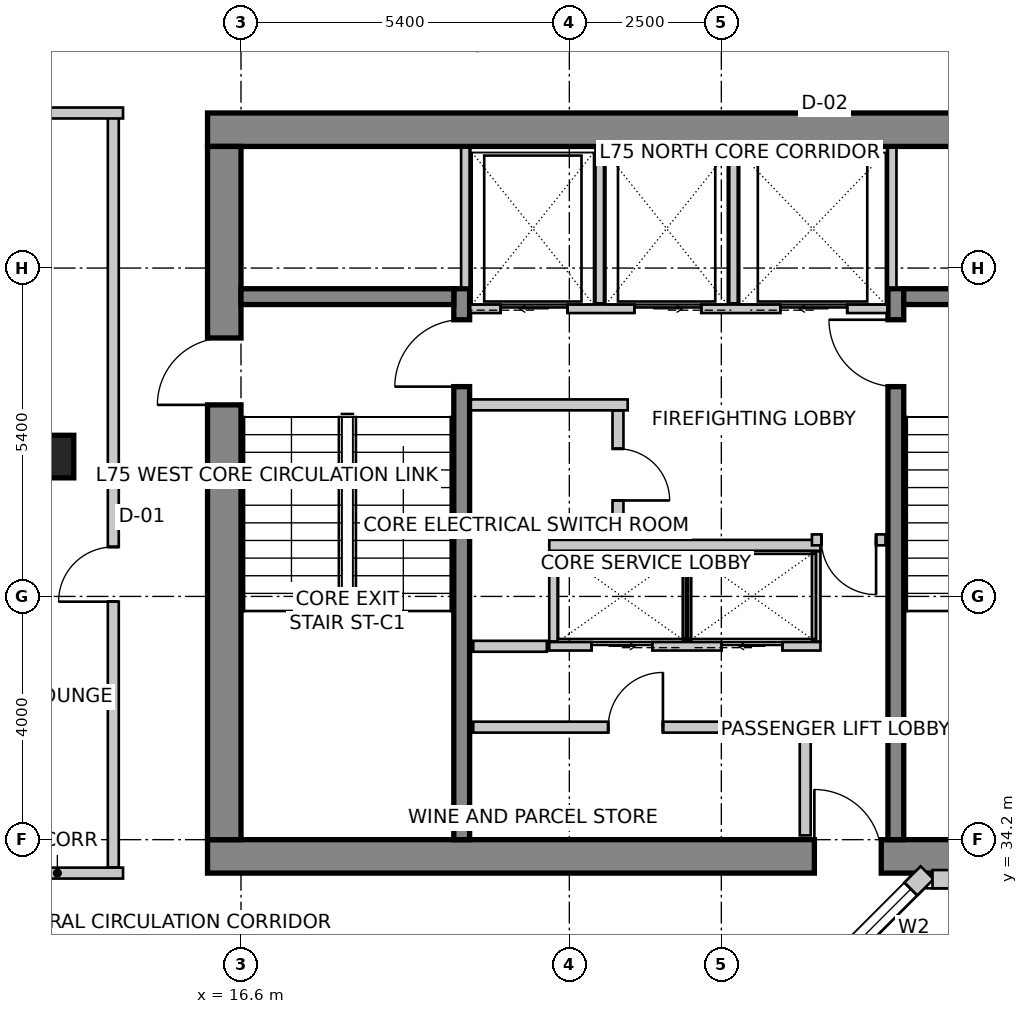
"""IFC4 building model, lengths in metres.
Left out: names, types, materials, properties, quantities, classifications, styles, units other than length and angle.
Written with IfcOpenShell. Run it as: python <this file> out.ifc"""

import sys

from ifc_helpers import new_model, si_unit, direction, frame, frame_2d, origin, origin_2d, place, context, subcontext, project, spatial, rectangle, extrude, source, transform, mapped, element, fill, save


model = new_model("IFC4")
c1 = context("Model", 3, precision=1e-05, world=origin(), true_north=direction((0.0, 1.0)))
c2 = subcontext(c1, "Body", "Model", "MODEL_VIEW")
j1 = project(units=[si_unit("LENGTHUNIT", "METRE"), si_unit("PLANEANGLEUNIT", "RADIAN")], contexts=[c1])
p1 = place(None, origin())
s1 = spatial("IfcSite", under=j1, at=p1, CompositionType="ELEMENT")
p2 = place(p1, origin())
s2 = spatial("IfcBuilding", under=s1, at=p2, CompositionType="ELEMENT")
p3 = place(p2, frame((0.0, 0.0, 292.5)))
s3 = spatial("IfcBuildingStorey", under=s2, at=p3, CompositionType="ELEMENT", Elevation=292.5)
p4 = place(p3, frame((16.05, 45.875, 0.0), z_axis=(0.0, 0.0, 1.0), x_axis=(1.0, 0.0, 0.0)))
e1 = element("IfcWall", 1, at=p4, inside=s3, PredefinedType="SHEAR", context=c2, shape_type="SweptSolid", body=[
    extrude(rectangle(XDim=15.5, YDim=0.55, at=frame_2d((7.75, 0.0))), origin(), (0.0, 0.0, 1.0), 4.0),
])
p5 = place(p3, frame((16.05, 33.925, 0.0), z_axis=(0.0, 0.0, 1.0), x_axis=(1.0, 0.0, 0.0)))
e2 = element("IfcWall", 2, at=p5, inside=s3, PredefinedType="SHEAR", context=c2, shape_type="SweptSolid", body=[
    extrude(rectangle(XDim=15.5, YDim=0.55, at=frame_2d((7.75, 0.0))), origin(), (0.0, 0.0, 1.0), 4.0),
])
m1 = source(origin(), c2, "Body", "SweptSolid", [
    extrude(rectangle(XDim=1.1, YDim=2.15, at=frame_2d((0.55, 1.075))), frame((0.0, 0.285, 0.0), z_axis=(0.0, -1.0, 0.0), x_axis=(1.0, 0.0, 0.0)), (0.0, 0.0, 1.0), 0.57),
])
p6 = place(p5, frame((9.98, 0.0, 0.0)))
e3 = element("IfcOpeningElement", 3, at=p6, cuts=e2, PredefinedType="OPENING", context=c2, shape_type="MappedRepresentation", body=[
    mapped(m1, transform((0.0, 0.0, 0.0), scale=1.0)),
])
p7 = place(p3, frame((16.325, 34.2, 0.0), z_axis=(0.0, 0.0, 1.0), x_axis=(0.0, 1.0, 0.0)))
e4 = element("IfcWall", 4, at=p7, inside=s3, PredefinedType="SHEAR", context=c2, shape_type="SweptSolid", body=[
    extrude(rectangle(XDim=11.4, YDim=0.55, at=frame_2d((5.7, 0.0))), origin(), (0.0, 0.0, 1.0), 4.0),
])
p8 = place(p7, frame((7.15, 0.0, 0.0)))
e5 = element("IfcOpeningElement", 5, at=p8, cuts=e4, PredefinedType="OPENING", context=c2, shape_type="MappedRepresentation", body=[
    mapped(m1, transform((0.0, 0.0, 0.0), scale=1.0)),
])
p9 = place(p3, frame((20.23, 34.2, 0.0), z_axis=(0.0, 0.0, 1.0), x_axis=(0.0, 1.0, 0.0)))
e6 = element("IfcWall", 6, at=p9, inside=s3, PredefinedType="SHEAR", context=c2, shape_type="SweptSolid", body=[
    extrude(rectangle(XDim=9.06, YDim=0.26, at=frame_2d((4.53, 0.0))), origin(), (0.0, 0.0, 1.0), 4.0),
])
m2 = source(origin(), c2, "Body", "SweptSolid", [
    extrude(rectangle(XDim=1.1, YDim=2.15, at=frame_2d((0.55, 1.075))), frame((0.0, 0.14, 0.0), z_axis=(0.0, -1.0, 0.0), x_axis=(1.0, 0.0, 0.0)), (0.0, 0.0, 1.0), 0.28),
])
p10 = place(p9, frame((7.45, 0.0, 0.0)))
e7 = element("IfcOpeningElement", 7, at=p10, cuts=e6, PredefinedType="OPENING", context=c2, shape_type="MappedRepresentation", body=[
    mapped(m2, transform((0.0, 0.0, 0.0), scale=1.0)),
])
p11 = place(p3, frame((27.37, 34.2, 0.0), z_axis=(0.0, 0.0, 1.0), x_axis=(0.0, 1.0, 0.0)))
e8 = element("IfcWall", 8, at=p11, inside=s3, PredefinedType="SHEAR", context=c2, shape_type="SweptSolid", body=[
    extrude(rectangle(XDim=9.06, YDim=0.26, at=frame_2d((4.53, 0.0))), origin(), (0.0, 0.0, 1.0), 4.0),
])
p12 = place(p11, frame((7.45, 0.0, 0.0)))
e9 = element("IfcOpeningElement", 9, at=p12, cuts=e8, PredefinedType="OPENING", context=c2, shape_type="MappedRepresentation", body=[
    mapped(m2, transform((0.0, 0.0, 0.0), scale=1.0)),
])
for number, where, z_axis, x_axis in (
    (10, (16.6, 43.13, 0.0), (0.0, 0.0, 1.0), (1.0, 0.0, 0.0)),
    (11, (27.5, 43.13, 0.0), (0.0, 0.0, 1.0), (1.0, 0.0, 0.0)),
):
    element("IfcWall", number, at=place(p3, frame(where, z_axis=z_axis, x_axis=x_axis)), inside=s3, PredefinedType="SHEAR", context=c2, shape_type="SweptSolid", body=[
        extrude(rectangle(XDim=3.5, YDim=0.26, at=frame_2d((1.75, 0.0))), origin(), (0.0, 0.0, 1.0), 4.0),
    ])
m3 = source(origin(), c2, "Body", "SweptSolid", [
    extrude(rectangle(XDim=0.7, YDim=0.7, at=origin_2d()), origin(), (0.0, 0.0, 1.0), 4.0),
])
p13 = place(p3, frame((13.5, 40.5, 0.0), z_axis=(0.0, 0.0, 1.0), x_axis=(1.0, 0.0, 0.0)))
e12 = element("IfcColumn", 12, at=p13, inside=s3, PredefinedType="COLUMN", context=c2, shape_type="MappedRepresentation", body=[
    mapped(m3, transform((0.0, 0.0, 0.0), scale=1.0)),
])
p14 = place(p3, frame((25.828, 31.6, 0.0), z_axis=(0.0, 0.0, 1.0), x_axis=(0.707106781187, 0.707106781187, 0.0)))
e13 = element("IfcWall", 13, at=p14, inside=s3, PredefinedType="SOLIDWALL", context=c2, shape_type="SweptSolid", body=[
    extrude(rectangle(XDim=2.907, YDim=0.3, at=frame_2d((1.454, 0.0))), origin(), (0.0, 0.0, 1.0), 3.75),
])
m4 = source(origin(), c2, "Body", "SweptSolid", [
    extrude(rectangle(XDim=1.8, YDim=2.1, at=frame_2d((0.9, 1.05))), frame((0.0, 0.16, 0.0), z_axis=(0.0, -1.0, 0.0), x_axis=(1.0, 0.0, 0.0)), (0.0, 0.0, 1.0), 0.32),
])
p15 = place(p14, frame((0.729, 0.0, 0.85)))
e14 = element("IfcOpeningElement", 14, at=p15, cuts=e13, PredefinedType="OPENING", context=c2, shape_type="MappedRepresentation", body=[
    mapped(m4, transform((0.0, 0.0, 0.0), scale=1.0)),
])
p16 = place(p3, frame((27.973, 33.55, 0.0), z_axis=(0.0, 0.0, 1.0), x_axis=(1.0, 0.0, 0.0)))
e15 = element("IfcWall", 15, at=p16, inside=s3, PredefinedType="SOLIDWALL", context=c2, shape_type="SweptSolid", body=[
    extrude(rectangle(XDim=9.115, YDim=0.3, at=frame_2d((4.558, 0.0))), origin(), (0.0, 0.0, 1.0), 3.75),
])
m5 = source(origin(), c2, "Body", "SweptSolid", [
    extrude(rectangle(XDim=2.4, YDim=2.2, at=frame_2d((1.2, 1.1))), frame((0.0, 0.16, 0.0), z_axis=(0.0, -1.0, 0.0), x_axis=(1.0, 0.0, 0.0)), (0.0, 0.0, 1.0), 0.32),
])
p17 = place(p16, frame((1.239, 0.0, 0.85)))
e16 = element("IfcOpeningElement", 16, at=p17, cuts=e15, PredefinedType="OPENING", context=c2, shape_type="MappedRepresentation", body=[
    mapped(m5, transform((0.0, 0.0, 0.0), scale=1.0)),
])
m6 = source(origin(), c2, "Body", "SweptSolid", [
    extrude(rectangle(XDim=2.8, YDim=2.4, at=frame_2d((1.4, 1.2))), frame((0.0, 0.16, 0.0), z_axis=(0.0, -1.0, 0.0), x_axis=(1.0, 0.0, 0.0)), (0.0, 0.0, 1.0), 0.32),
])
p18 = place(p16, frame((5.276, 0.0, 0.85)))
e17 = element("IfcOpeningElement", 17, at=p18, cuts=e15, PredefinedType="OPENING", context=c2, shape_type="MappedRepresentation", body=[
    mapped(m6, transform((0.0, 0.0, 0.0), scale=1.0)),
])
p19 = place(p3, frame((21.873, 52.741, 0.0), z_axis=(0.0, 0.0, 1.0), x_axis=(-0.843661487732, -0.536875492193, 0.0)))
e18 = element("IfcWall", 18, at=p19, inside=s3, PredefinedType="SOLIDWALL", context=c2, shape_type="SweptSolid", body=[
    extrude(rectangle(XDim=10.282, YDim=0.3, at=frame_2d((5.141, 0.0))), origin(), (0.0, 0.0, 1.0), 3.75),
])
p20 = place(p19, frame((1.06, 0.0, 0.85)))
e19 = element("IfcOpeningElement", 19, at=p20, cuts=e18, PredefinedType="OPENING", context=c2, shape_type="MappedRepresentation", body=[
    mapped(m6, transform((0.0, 0.0, 0.0), scale=1.0)),
])
p21 = place(p19, frame((5.539, 0.0, 0.85)))
e20 = element("IfcOpeningElement", 20, at=p21, cuts=e18, PredefinedType="OPENING", context=c2, shape_type="MappedRepresentation", body=[
    mapped(m5, transform((0.0, 0.0, 0.0), scale=1.0)),
])
p22 = place(p3, frame((20.37, 42.93, 0.0), z_axis=(0.0, 0.0, 1.0), x_axis=(1.0, 0.0, 0.0)))
e21 = element("IfcWall", 21, at=p22, inside=s3, PredefinedType="SOLIDWALL", context=c2, shape_type="SweptSolid", body=[
    extrude(rectangle(XDim=6.86, YDim=0.14, at=frame_2d((3.43, 0.0))), origin(), (0.0, 0.0, 1.0), 3.75),
])
m7 = source(origin(), c2, "Body", "SweptSolid", [
    extrude(rectangle(XDim=1.1, YDim=2.15, at=frame_2d((0.55, 1.075))), frame((0.0, 0.08, 0.0), z_axis=(0.0, -1.0, 0.0), x_axis=(1.0, 0.0, 0.0)), (0.0, 0.0, 1.0), 0.16),
])
p23 = place(p22, frame((0.5, 0.0, 0.0)))
e22 = element("IfcOpeningElement", 22, at=p23, cuts=e21, PredefinedType="OPENING", context=c2, shape_type="MappedRepresentation", body=[
    mapped(m7, transform((0.0, 0.0, 0.0), scale=1.0)),
])
p24 = place(p22, frame((2.7, 0.0, 0.0)))
e23 = element("IfcOpeningElement", 23, at=p24, cuts=e21, PredefinedType="OPENING", context=c2, shape_type="MappedRepresentation", body=[
    mapped(m7, transform((0.0, 0.0, 0.0), scale=1.0)),
])
p25 = place(p22, frame((5.1, 0.0, 0.0)))
e24 = element("IfcOpeningElement", 24, at=p25, cuts=e21, PredefinedType="OPENING", context=c2, shape_type="MappedRepresentation", body=[
    mapped(m7, transform((0.0, 0.0, 0.0), scale=1.0)),
])
for number, where, z_axis, x_axis in (
    (25, (20.29, 43.28, 0.0), (0.0, 0.0, 1.0), (0.0, 1.0, 0.0)),
    (26, (27.31, 43.28, 0.0), (0.0, 0.0, 1.0), (0.0, 1.0, 0.0)),
):
    element("IfcWall", number, at=place(p3, frame(where, z_axis=z_axis, x_axis=x_axis)), inside=s3, PredefinedType="SOLIDWALL", context=c2, shape_type="SweptSolid", body=[
        extrude(rectangle(XDim=2.3, YDim=0.14, at=frame_2d((1.15, 0.0))), origin(), (0.0, 0.0, 1.0), 3.75),
    ])
for number, where, z_axis, x_axis in (
    (27, (22.5, 43.02, 0.0), (0.0, 0.0, 1.0), (0.0, 1.0, 0.0)),
    (28, (24.7, 43.02, 0.0), (0.0, 0.0, 1.0), (0.0, 1.0, 0.0)),
):
    element("IfcWall", number, at=place(p3, frame(where, z_axis=z_axis, x_axis=x_axis)), inside=s3, PredefinedType="SOLIDWALL", context=c2, shape_type="SweptSolid", body=[
        extrude(rectangle(XDim=2.56, YDim=0.14, at=frame_2d((1.28, 0.0))), origin(), (0.0, 0.0, 1.0), 3.75),
    ])
p26 = place(p3, frame((21.67, 37.38, 0.0), z_axis=(0.0, 0.0, 1.0), x_axis=(1.0, 0.0, 0.0)))
e29 = element("IfcWall", 29, at=p26, inside=s3, PredefinedType="SOLIDWALL", context=c2, shape_type="SweptSolid", body=[
    extrude(rectangle(XDim=4.46, YDim=0.14, at=frame_2d((2.23, 0.0))), origin(), (0.0, 0.0, 1.0), 3.75),
])
m8 = source(origin(), c2, "Body", "SweptSolid", [
    extrude(rectangle(XDim=1.0, YDim=2.15, at=frame_2d((0.5, 1.075))), frame((0.0, 0.08, 0.0), z_axis=(0.0, -1.0, 0.0), x_axis=(1.0, 0.0, 0.0)), (0.0, 0.0, 1.0), 0.16),
])
p27 = place(p26, frame((0.695, 0.0, 0.0)))
e30 = element("IfcOpeningElement", 30, at=p27, cuts=e29, PredefinedType="OPENING", context=c2, shape_type="MappedRepresentation", body=[
    mapped(m8, transform((0.0, 0.0, 0.0), scale=1.0)),
])
p28 = place(p26, frame((2.835, 0.0, 0.0)))
e31 = element("IfcOpeningElement", 31, at=p28, cuts=e29, PredefinedType="OPENING", context=c2, shape_type="MappedRepresentation", body=[
    mapped(m8, transform((0.0, 0.0, 0.0), scale=1.0)),
])
p29 = place(p3, frame((21.67, 39.04, 0.0), z_axis=(0.0, 0.0, 1.0), x_axis=(1.0, 0.0, 0.0)))
e32 = element("IfcWall", 32, at=p29, inside=s3, PredefinedType="SOLIDWALL", context=c2, shape_type="SweptSolid", body=[
    extrude(rectangle(XDim=4.46, YDim=0.18, at=frame_2d((2.23, 0.0))), origin(), (0.0, 0.0, 1.0), 3.75),
])
for number, where, z_axis, x_axis in (
    (33, (26.06, 37.46, 0.0), (0.0, 0.0, 1.0), (0.0, 1.0, 0.0)),
    (34, (21.74, 37.46, 0.0), (0.0, 0.0, 1.0), (0.0, 1.0, 0.0)),
    (35, (23.935, 37.46, 0.0), (0.0, 0.0, 1.0), (0.0, 1.0, 0.0)),
):
    element("IfcWall", number, at=place(p3, frame(where, z_axis=z_axis, x_axis=x_axis)), inside=s3, PredefinedType="SOLIDWALL", context=c2, shape_type="SweptSolid", body=[
        extrude(rectangle(XDim=1.48, YDim=0.14, at=frame_2d((0.74, 0.0))), origin(), (0.0, 0.0, 1.0), 3.75),
    ])
p30 = place(p3, frame((22.96, 41.35, 0.0), z_axis=(0.0, 0.0, 1.0), x_axis=(-1.0, 0.0, 0.0)))
e36 = element("IfcWall", 36, at=p30, inside=s3, PredefinedType="PARTITIONING", context=c2, shape_type="SweptSolid", body=[
    extrude(rectangle(XDim=2.58, YDim=0.18, at=frame_2d((1.29, 0.0))), origin(), (0.0, 0.0, 1.0), 3.75),
])
p31 = place(p3, frame((22.8, 41.256, 0.0), z_axis=(0.0, 0.0, 1.0), x_axis=(0.0, -1.0, 0.0)))
e37 = element("IfcWall", 37, at=p31, inside=s3, PredefinedType="PARTITIONING", context=c2, shape_type="SweptSolid", body=[
    extrude(rectangle(XDim=2.106, YDim=0.18, at=frame_2d((1.053, 0.0))), origin(), (0.0, 0.0, 1.0), 3.75),
])
m9 = source(origin(), c2, "Body", "SweptSolid", [
    extrude(rectangle(XDim=0.85, YDim=2.15, at=frame_2d((0.425, 1.075))), frame((0.0, 0.1, 0.0), z_axis=(0.0, -1.0, 0.0), x_axis=(1.0, 0.0, 0.0)), (0.0, 0.0, 1.0), 0.2),
])
p32 = place(p31, frame((0.628, 0.0, 0.0)))
e38 = element("IfcOpeningElement", 38, at=p32, cuts=e37, PredefinedType="OPENING", context=c2, shape_type="MappedRepresentation", body=[
    mapped(m9, transform((0.0, 0.0, 0.0), scale=1.0)),
])
p33 = place(p3, frame((21.63, 37.38, 0.0), z_axis=(0.0, 0.0, 1.0), x_axis=(-1.0, 0.0, 0.0)))
e39 = element("IfcWall", 39, at=p33, inside=s3, PredefinedType="PARTITIONING", context=c2, shape_type="SweptSolid", body=[
    extrude(rectangle(XDim=1.21, YDim=0.18, at=frame_2d((0.605, 0.0))), origin(), (0.0, 0.0, 1.0), 3.75),
])
p34 = place(p3, frame((27.2, 39.13, 0.0), z_axis=(0.0, 0.0, 1.0), x_axis=(-1.0, 0.0, 0.0)))
e40 = element("IfcWall", 40, at=p34, inside=s3, PredefinedType="PARTITIONING", context=c2, shape_type="SweptSolid", body=[
    extrude(rectangle(XDim=1.21, YDim=0.18, at=frame_2d((0.605, 0.0))), origin(), (0.0, 0.0, 1.0), 3.75),
])
m10 = source(origin(), c2, "Body", "SweptSolid", [
    extrude(rectangle(XDim=0.9, YDim=2.15, at=frame_2d((0.45, 1.075))), frame((0.0, 0.1, 0.0), z_axis=(0.0, -1.0, 0.0), x_axis=(1.0, 0.0, 0.0)), (0.0, 0.0, 1.0), 0.2),
])
p35 = place(p34, frame((0.155, 0.0, 0.0)))
e41 = element("IfcOpeningElement", 41, at=p35, cuts=e40, PredefinedType="OPENING", context=c2, shape_type="MappedRepresentation", body=[
    mapped(m10, transform((0.0, 0.0, 0.0), scale=1.0)),
])
p36 = place(p3, frame((20.42, 36.05, 0.0), z_axis=(0.0, 0.0, 1.0), x_axis=(1.0, 0.0, 0.0)))
e42 = element("IfcWall", 42, at=p36, inside=s3, PredefinedType="PARTITIONING", context=c2, shape_type="SweptSolid", body=[
    extrude(rectangle(XDim=5.46, YDim=0.18, at=frame_2d((2.73, 0.0))), origin(), (0.0, 0.0, 1.0), 3.75),
])
p37 = place(p36, frame((2.219, 0.0, 0.0)))
e43 = element("IfcOpeningElement", 43, at=p37, cuts=e42, PredefinedType="OPENING", context=c2, shape_type="MappedRepresentation", body=[
    mapped(m10, transform((0.0, 0.0, 0.0), scale=1.0)),
])
p38 = place(p3, frame((25.88, 35.956, 0.0), z_axis=(0.0, 0.0, 1.0), x_axis=(0.0, -1.0, 0.0)))
e44 = element("IfcWall", 44, at=p38, inside=s3, PredefinedType="PARTITIONING", context=c2, shape_type="SweptSolid", body=[
    extrude(rectangle(XDim=1.686, YDim=0.18, at=frame_2d((0.843, 0.0))), origin(), (0.0, 0.0, 1.0), 3.042),
])
p39 = place(p3, frame((12.5, 33.65, 0.0), z_axis=(0.0, 0.0, 1.0), x_axis=(1.0, 0.0, 0.0)))
e45 = element("IfcWall", 45, at=p39, inside=s3, PredefinedType="PARTITIONING", context=c2, shape_type="SweptSolid", body=[
    extrude(rectangle(XDim=2.16, YDim=0.18, at=frame_2d((1.08, 0.0))), origin(), (0.0, 0.0, 1.0), 3.75),
])
p40 = place(p3, frame((14.5, 33.744, 0.0), z_axis=(0.0, 0.0, 1.0), x_axis=(0.0, 1.0, 0.0)))
e46 = element("IfcWall", 46, at=p40, inside=s3, PredefinedType="PARTITIONING", context=c2, shape_type="SweptSolid", body=[
    extrude(rectangle(XDim=12.406, YDim=0.18, at=frame_2d((6.203, 0.0))), origin(), (0.0, 0.0, 1.0), 3.75),
])
p41 = place(p40, frame((4.37, 0.0, 0.0)))
e47 = element("IfcOpeningElement", 47, at=p41, cuts=e46, PredefinedType="OPENING", context=c2, shape_type="MappedRepresentation", body=[
    mapped(m10, transform((0.0, 0.0, 0.0), scale=1.0)),
])
p42 = place(p3, frame((14.66, 46.15, 0.0), z_axis=(0.0, 0.0, 1.0), x_axis=(-1.0, 0.0, 0.0)))
e48 = element("IfcWall", 48, at=p42, inside=s3, PredefinedType="PARTITIONING", context=c2, shape_type="SweptSolid", body=[
    extrude(rectangle(XDim=1.602, YDim=0.18, at=frame_2d((0.801, 0.0))), origin(), (0.0, 0.0, 1.0), 3.75),
])
m11 = source(origin(), c2, "Body", "SweptSolid", [
    extrude(rectangle(XDim=1.8, YDim=2.1, at=frame_2d((0.9, 1.05))), frame((0.0, -0.015, 0.0), z_axis=(0.0, -1.0, 0.0), x_axis=(1.0, 0.0, 0.0)), (0.0, 0.0, 1.0), 0.06),
])
p43 = place(p15, origin())
e49 = element("IfcWindow", 49, at=p43, inside=s3, PartitioningType="SINGLE_PANEL", PredefinedType="WINDOW", context=c2, shape_type="MappedRepresentation", body=[
    mapped(m11, transform((0.0, 0.0, 0.0), scale=1.0)),
])
fill(e14, e49)
m12 = source(origin(), c2, "Body", "SweptSolid", [
    extrude(rectangle(XDim=1.1, YDim=2.15, at=frame_2d((0.55, 1.075))), frame((0.0, 0.025, 0.0), z_axis=(0.0, -1.0, 0.0), x_axis=(1.0, 0.0, 0.0)), (0.0, 0.0, 1.0), 0.05),
])
p44 = place(p23, origin())
e50 = element("IfcDoor", 50, at=p44, inside=s3, OperationType="SLIDING_TO_LEFT", PredefinedType="DOOR", context=c2, shape_type="MappedRepresentation", body=[
    mapped(m12, transform((0.0, 0.0, 0.0), scale=1.0)),
])
fill(e22, e50)
p45 = place(p24, origin())
e51 = element("IfcDoor", 51, at=p45, inside=s3, OperationType="SLIDING_TO_RIGHT", PredefinedType="DOOR", context=c2, shape_type="MappedRepresentation", body=[
    mapped(m12, transform((0.0, 0.0, 0.0), scale=1.0)),
])
fill(e23, e51)
m13 = source(origin(), c2, "Body", "SweptSolid", [
    extrude(rectangle(XDim=1.1, YDim=2.15, at=frame_2d((0.55, 1.075))), frame((0.0, 0.025, 0.0), z_axis=(0.0, -1.0, 0.0), x_axis=(1.0, 0.0, 0.0)), (0.0, 0.0, 1.0), 0.05),
])
p46 = place(p25, origin())
e52 = element("IfcDoor", 52, at=p46, inside=s3, OperationType="SLIDING_TO_LEFT", PredefinedType="DOOR", context=c2, shape_type="MappedRepresentation", body=[
    mapped(m13, transform((0.0, 0.0, 0.0), scale=1.0)),
])
fill(e24, e52)
m14 = source(origin(), c2, "Body", "SweptSolid", [
    extrude(rectangle(XDim=1.0, YDim=2.15, at=frame_2d((0.5, 1.075))), frame((0.0, 0.025, 0.0), z_axis=(0.0, -1.0, 0.0), x_axis=(1.0, 0.0, 0.0)), (0.0, 0.0, 1.0), 0.05),
])
p47 = place(p27, origin())
e53 = element("IfcDoor", 53, at=p47, inside=s3, OperationType="SLIDING_TO_RIGHT", PredefinedType="DOOR", context=c2, shape_type="MappedRepresentation", body=[
    mapped(m14, transform((0.0, 0.0, 0.0), scale=1.0)),
])
fill(e30, e53)
p48 = place(p28, origin())
e54 = element("IfcDoor", 54, at=p48, inside=s3, OperationType="SLIDING_TO_LEFT", PredefinedType="DOOR", context=c2, shape_type="MappedRepresentation", body=[
    mapped(m14, transform((0.0, 0.0, 0.0), scale=1.0)),
])
fill(e31, e54)
m15 = source(origin(), c2, "Body", "SweptSolid", [
    extrude(rectangle(XDim=1.1, YDim=2.15, at=frame_2d((0.55, 1.075))), frame((0.0, 0.025, 0.0), z_axis=(0.0, -1.0, 0.0), x_axis=(1.0, 0.0, 0.0)), (0.0, 0.0, 1.0), 0.05),
])
p49 = place(p10, origin())
e55 = element("IfcDoor", 55, at=p49, inside=s3, OperationType="SINGLE_SWING_LEFT", PredefinedType="DOOR", context=c2, shape_type="MappedRepresentation", body=[
    mapped(m15, transform((0.0, 0.0, 0.0), scale=1.0)),
])
fill(e7, e55)
p50 = place(p12, origin())
e56 = element("IfcDoor", 56, at=p50, inside=s3, OperationType="SINGLE_SWING_RIGHT", PredefinedType="DOOR", context=c2, shape_type="MappedRepresentation", body=[
    mapped(m15, transform((0.0, 0.0, 0.0), scale=1.0)),
])
fill(e9, e56)
p51 = place(p8, origin())
e57 = element("IfcDoor", 57, at=p51, inside=s3, OperationType="SINGLE_SWING_LEFT", PredefinedType="DOOR", context=c2, shape_type="MappedRepresentation", body=[
    mapped(m15, transform((0.0, 0.0, 0.0), scale=1.0)),
])
fill(e5, e57)
p52 = place(p6, origin())
e58 = element("IfcDoor", 58, at=p52, inside=s3, OperationType="SINGLE_SWING_LEFT", PredefinedType="DOOR", context=c2, shape_type="MappedRepresentation", body=[
    mapped(m15, transform((0.0, 0.0, 0.0), scale=1.0)),
])
fill(e3, e58)
m16 = source(origin(), c2, "Body", "SweptSolid", [
    extrude(rectangle(XDim=0.85, YDim=2.15, at=frame_2d((0.425, 1.075))), frame((0.0, 0.025, 0.0), z_axis=(0.0, -1.0, 0.0), x_axis=(1.0, 0.0, 0.0)), (0.0, 0.0, 1.0), 0.05),
])
p53 = place(p32, origin())
e59 = element("IfcDoor", 59, at=p53, inside=s3, OperationType="SINGLE_SWING_RIGHT", PredefinedType="DOOR", context=c2, shape_type="MappedRepresentation", body=[
    mapped(m16, transform((0.0, 0.0, 0.0), scale=1.0)),
])
fill(e38, e59)
m17 = source(origin(), c2, "Body", "SweptSolid", [
    extrude(rectangle(XDim=0.9, YDim=2.15, at=frame_2d((0.45, 1.075))), frame((0.0, 0.025, 0.0), z_axis=(0.0, -1.0, 0.0), x_axis=(1.0, 0.0, 0.0)), (0.0, 0.0, 1.0), 0.05),
])
p54 = place(p35, origin())
e60 = element("IfcDoor", 60, at=p54, inside=s3, OperationType="SINGLE_SWING_LEFT", PredefinedType="DOOR", context=c2, shape_type="MappedRepresentation", body=[
    mapped(m17, transform((0.0, 0.0, 0.0), scale=1.0)),
])
fill(e41, e60)
p55 = place(p37, origin())
e61 = element("IfcDoor", 61, at=p55, inside=s3, OperationType="SINGLE_SWING_RIGHT", PredefinedType="DOOR", context=c2, shape_type="MappedRepresentation", body=[
    mapped(m17, transform((0.0, 0.0, 0.0), scale=1.0)),
])
fill(e43, e61)
m18 = source(origin(), c2, "Body", "SweptSolid", [
    extrude(rectangle(XDim=0.9, YDim=2.15, at=frame_2d((0.45, 1.075))), frame((0.0, 0.025, 0.0), z_axis=(0.0, -1.0, 0.0), x_axis=(1.0, 0.0, 0.0)), (0.0, 0.0, 1.0), 0.05),
])
p56 = place(p41, origin())
e62 = element("IfcDoor", 62, at=p56, inside=s3, OperationType="SINGLE_SWING_LEFT", PredefinedType="DOOR", context=c2, shape_type="MappedRepresentation", body=[
    mapped(m18, transform((0.0, 0.0, 0.0), scale=1.0)),
])
fill(e47, e62)
save(model, sys.argv[1])
